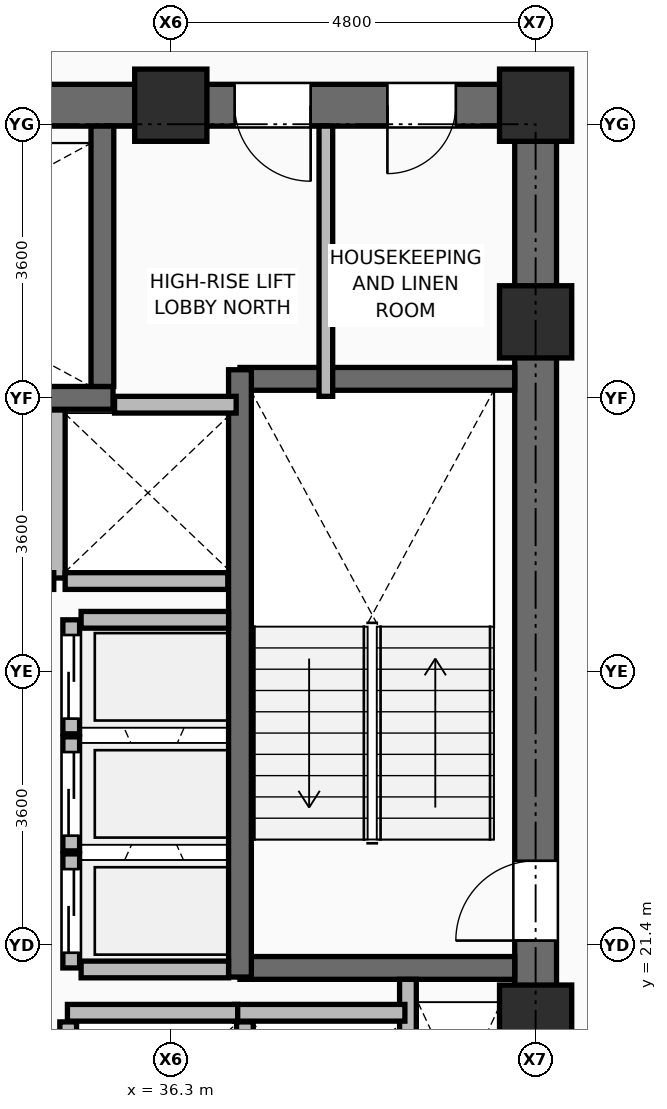
"""IFC4 building model, lengths in metres.
Left out: names, types, materials, properties, quantities, classifications, styles, units other than length and angle.
Written with IfcOpenShell. Run it as: python <this file> out.ifc"""

import sys

from ifc_helpers import new_model, si_unit, direction, frame, frame_2d, origin, origin_2d, place, context, subcontext, project, spatial, rectangle, extrude, element, fill, save


model = new_model("IFC4")
c1 = context("Model", 3, precision=1e-05, world=origin(), true_north=direction((0.0, 1.0)))
c2 = subcontext(c1, "Body", "Model", "MODEL_VIEW")
j1 = project(units=[si_unit("LENGTHUNIT", "METRE"), si_unit("PLANEANGLEUNIT", "RADIAN")], contexts=[c1])
p1 = place(None, origin())
s1 = spatial("IfcSite", under=j1, at=p1, CompositionType="ELEMENT")
p2 = place(p1, origin())
s2 = spatial("IfcBuilding", under=s1, at=p2, CompositionType="ELEMENT")
p3 = place(p2, frame((0.0, 0.0, 172.2)))
s3 = spatial("IfcBuildingStorey", under=s2, at=p3, CompositionType="ELEMENT", Elevation=172.2)
for number, where, z_axis, x_axis in (
    (1, (41.1, 20.4, 0.0), (0.0, 0.0, 1.0), (1.0, 0.0, 0.0)),
    (2, (41.1, 29.6, 0.0), (0.0, 0.0, 1.0), (1.0, 0.0, 0.0)),
    (3, (36.3, 32.45, 0.0), (0.0, 0.0, 1.0), (1.0, 0.0, 0.0)),
    (4, (41.1, 32.45, 0.0), (0.0, 0.0, 1.0), (1.0, 0.0, 0.0)),
):
    element("IfcColumn", number, at=place(p3, frame(where, z_axis=z_axis, x_axis=x_axis)), inside=s3, PredefinedType="COLUMN", context=c2, shape_type="SweptSolid", body=[
        extrude(rectangle(XDim=0.95, YDim=0.95, at=origin_2d()), origin(), (0.0, 0.0, 1.0), 3.75),
    ])
p4 = place(p3, frame((34.95, 17.92, 0.0), z_axis=(0.0, 0.0, 1.0), x_axis=(0.0, 1.0, 0.0)))
e5 = element("IfcWall", 5, at=p4, inside=s3, PredefinedType="PARTITIONING", context=c2, shape_type="SweptSolid", body=[
    extrude(rectangle(XDim=2.47, YDim=0.22, at=frame_2d((1.235, 0.0))), origin(), (0.0, 0.0, 1.0), 2.936),
])
p5 = place(p3, frame((37.275, 18.08, 0.0), z_axis=(0.0, 0.0, 1.0), x_axis=(0.0, 1.0, 0.0)))
e6 = element("IfcWall", 6, at=p5, inside=s3, PredefinedType="PARTITIONING", context=c2, shape_type="SweptSolid", body=[
    extrude(rectangle(XDim=2.31, YDim=0.22, at=frame_2d((1.155, 0.0))), origin(), (0.0, 0.0, 1.0), 3.475),
])
p6 = place(p3, frame((34.8, 26.23, 0.0), z_axis=(0.0, 0.0, 1.0), x_axis=(0.0, 1.0, 0.0)))
e7 = element("IfcWall", 7, at=p6, inside=s3, PredefinedType="PARTITIONING", context=c2, shape_type="SweptSolid", body=[
    extrude(rectangle(XDim=2.21, YDim=0.22, at=frame_2d((1.105, 0.0))), origin(), (0.0, 0.0, 1.0), 3.475),
])
p7 = place(p3, frame((34.91, 26.19, 0.0), z_axis=(0.0, 0.0, 1.0), x_axis=(1.0, 0.0, 0.0)))
e8 = element("IfcWall", 8, at=p7, inside=s3, PredefinedType="PARTITIONING", context=c2, shape_type="SweptSolid", body=[
    extrude(rectangle(XDim=2.14, YDim=0.22, at=frame_2d((1.07, 0.0))), origin(), (0.0, 0.0, 1.0), 3.475),
])
p8 = place(p3, frame((21.625, 32.45, 0.0), z_axis=(0.0, 0.0, 1.0), x_axis=(1.0, 0.0, 0.0)))
e9 = element("IfcWall", 9, at=p8, inside=s3, PredefinedType="SHEAR", context=c2, shape_type="SweptSolid", body=[
    extrude(rectangle(XDim=19.75, YDim=0.55, at=frame_2d((9.875, 0.0))), origin(), (0.0, 0.0, 1.0), 3.5),
])
p9 = place(p8, frame((2.125, 0.0, 0.0)))
e10 = element("IfcOpeningElement", 10, at=p9, cuts=e9, PredefinedType="OPENING", context=c2, shape_type="SweptSolid", body=[
    extrude(rectangle(XDim=1.1, YDim=2.1, at=frame_2d((0.55, 1.05))), frame((0.0, 0.285, 0.0), z_axis=(0.0, -1.0, 0.0), x_axis=(1.0, 0.0, 0.0)), (0.0, 0.0, 1.0), 0.57),
])
p10 = place(p8, frame((15.515, 0.0, 0.0)))
e11 = element("IfcOpeningElement", 11, at=p10, cuts=e9, PredefinedType="OPENING", context=c2, shape_type="SweptSolid", body=[
    extrude(rectangle(XDim=1.0, YDim=2.1, at=frame_2d((0.5, 1.05))), frame((0.0, 0.285, 0.0), z_axis=(0.0, -1.0, 0.0), x_axis=(1.0, 0.0, 0.0)), (0.0, 0.0, 1.0), 0.57),
])
p11 = place(p8, frame((17.525, 0.0, 0.0)))
e12 = element("IfcOpeningElement", 12, at=p11, cuts=e9, PredefinedType="OPENING", context=c2, shape_type="SweptSolid", body=[
    extrude(rectangle(XDim=0.9, YDim=2.1, at=frame_2d((0.45, 1.05))), frame((0.0, 0.285, 0.0), z_axis=(0.0, -1.0, 0.0), x_axis=(1.0, 0.0, 0.0)), (0.0, 0.0, 1.0), 0.57),
])
p12 = place(p3, frame((41.1, 18.075, 0.0), z_axis=(0.0, 0.0, 1.0), x_axis=(0.0, 1.0, 0.0)))
e13 = element("IfcWall", 13, at=p12, inside=s3, PredefinedType="SHEAR", context=c2, shape_type="SweptSolid", body=[
    extrude(rectangle(XDim=14.1, YDim=0.55, at=frame_2d((7.05, 0.0))), origin(), (0.0, 0.0, 1.0), 3.5),
])
p13 = place(p12, frame((3.385, 0.0, 0.0)))
e14 = element("IfcOpeningElement", 14, at=p13, cuts=e13, PredefinedType="OPENING", context=c2, shape_type="SweptSolid", body=[
    extrude(rectangle(XDim=1.05, YDim=2.1, at=frame_2d((0.525, 1.05))), frame((0.0, 0.285, 0.0), z_axis=(0.0, -1.0, 0.0), x_axis=(1.0, 0.0, 0.0)), (0.0, 0.0, 1.0), 0.57),
])
for number, where, z_axis, x_axis in (
    (15, (37.21, 21.1, 0.0), (0.0, 0.0, 1.0), (1.0, 0.0, 0.0)),
    (16, (37.21, 28.85, 0.0), (0.0, 0.0, 1.0), (1.0, 0.0, 0.0)),
):
    element("IfcWall", number, at=place(p3, frame(where, z_axis=z_axis, x_axis=x_axis)), inside=s3, PredefinedType="SHEAR", context=c2, shape_type="SweptSolid", body=[
        extrude(rectangle(XDim=3.615, YDim=0.3, at=frame_2d((1.808, 0.0))), origin(), (0.0, 0.0, 1.0), 3.5),
    ])
p14 = place(p3, frame((37.21, 20.98, 0.0), z_axis=(0.0, 0.0, 1.0), x_axis=(0.0, 1.0, 0.0)))
e17 = element("IfcWall", 17, at=p14, inside=s3, PredefinedType="SHEAR", context=c2, shape_type="SweptSolid", body=[
    extrude(rectangle(XDim=7.99, YDim=0.3, at=frame_2d((3.995, 0.0))), origin(), (0.0, 0.0, 1.0), 3.5),
])
p15 = place(p3, frame((27.51, 28.6, 0.0), z_axis=(0.0, 0.0, 1.0), x_axis=(1.0, 0.0, 0.0)))
e18 = element("IfcWall", 18, at=p15, inside=s3, PredefinedType="SHEAR", context=c2, shape_type="SweptSolid", body=[
    extrude(rectangle(XDim=8.03, YDim=0.3, at=frame_2d((4.015, 0.0))), origin(), (0.0, 0.0, 1.0), 3.5),
])
p16 = place(p3, frame((35.4, 28.75, 0.0), z_axis=(0.0, 0.0, 1.0), x_axis=(0.0, 1.0, 0.0)))
e19 = element("IfcWall", 19, at=p16, inside=s3, PredefinedType="SHEAR", context=c2, shape_type="SweptSolid", body=[
    extrude(rectangle(XDim=3.425, YDim=0.3, at=frame_2d((1.712, 0.0))), origin(), (0.0, 0.0, 1.0), 3.5),
])
p17 = place(p3, frame((39.42, 18.075, 0.0), z_axis=(0.0, 0.0, 1.0), x_axis=(0.0, 1.0, 0.0)))
e20 = element("IfcWall", 20, at=p17, inside=s3, PredefinedType="PARTITIONING", context=c2, shape_type="SweptSolid", body=[
    extrude(rectangle(XDim=2.875, YDim=0.22, at=frame_2d((1.438, 0.0))), origin(), (0.0, 0.0, 1.0), 3.48),
])
for number, where, z_axis, x_axis in (
    (21, (37.14, 20.51, 0.0), (0.0, 0.0, 1.0), (1.0, 0.0, 0.0)),
    (22, (34.94, 20.51, 0.0), (0.0, 0.0, 1.0), (1.0, 0.0, 0.0)),
):
    element("IfcWall", number, at=place(p3, frame(where, z_axis=z_axis, x_axis=x_axis)), inside=s3, PredefinedType="PARTITIONING", context=c2, shape_type="SweptSolid", body=[
        extrude(rectangle(XDim=2.24, YDim=0.22, at=frame_2d((1.12, 0.0))), origin(), (0.0, 0.0, 1.0), 3.48),
    ])
p18 = place(p3, frame((32.44, 26.19, 0.0), z_axis=(0.0, 0.0, 1.0), x_axis=(1.0, 0.0, 0.0)))
e23 = element("IfcWall", 23, at=p18, inside=s3, PredefinedType="PARTITIONING", context=c2, shape_type="SweptSolid", body=[
    extrude(rectangle(XDim=2.32, YDim=0.22, at=frame_2d((1.16, 0.0))), origin(), (0.0, 0.0, 1.0), 3.48),
])
p19 = place(p3, frame((35.56, 28.51, 0.0), z_axis=(0.0, 0.0, 1.0), x_axis=(1.0, 0.0, 0.0)))
e24 = element("IfcWall", 24, at=p19, inside=s3, PredefinedType="PARTITIONING", context=c2, shape_type="SweptSolid", body=[
    extrude(rectangle(XDim=1.6, YDim=0.22, at=frame_2d((0.8, 0.0))), origin(), (0.0, 0.0, 1.0), 3.48),
])
p20 = place(p3, frame((34.99, 21.1, 0.0), z_axis=(0.0, 0.0, 1.0), x_axis=(0.0, 1.0, 0.0)))
e25 = element("IfcWall", 25, at=p20, inside=s3, PredefinedType="PARTITIONING", context=c2, shape_type="SweptSolid", body=[
    extrude(rectangle(XDim=1.5, YDim=0.22, at=frame_2d((0.75, 0.0))), origin(), (0.0, 0.0, 1.0), 3.48),
])
p21 = place(p20, frame((0.2, 0.0, 0.0)))
e26 = element("IfcOpeningElement", 26, at=p21, cuts=e25, PredefinedType="OPENING", context=c2, shape_type="SweptSolid", body=[
    extrude(rectangle(XDim=1.1, YDim=2.2, at=frame_2d((0.55, 1.1))), frame((0.0, 0.12, 0.0), z_axis=(0.0, -1.0, 0.0), x_axis=(1.0, 0.0, 0.0)), (0.0, 0.0, 1.0), 0.24),
])
p22 = place(p3, frame((34.99, 22.64, 0.0), z_axis=(0.0, 0.0, 1.0), x_axis=(0.0, 1.0, 0.0)))
e27 = element("IfcWall", 27, at=p22, inside=s3, PredefinedType="PARTITIONING", context=c2, shape_type="SweptSolid", body=[
    extrude(rectangle(XDim=1.5, YDim=0.22, at=frame_2d((0.75, 0.0))), origin(), (0.0, 0.0, 1.0), 3.48),
])
p23 = place(p22, frame((0.2, 0.0, 0.0)))
e28 = element("IfcOpeningElement", 28, at=p23, cuts=e27, PredefinedType="OPENING", context=c2, shape_type="SweptSolid", body=[
    extrude(rectangle(XDim=1.1, YDim=2.2, at=frame_2d((0.55, 1.1))), frame((0.0, 0.12, 0.0), z_axis=(0.0, -1.0, 0.0), x_axis=(1.0, 0.0, 0.0)), (0.0, 0.0, 1.0), 0.24),
])
p24 = place(p3, frame((34.99, 24.18, 0.0), z_axis=(0.0, 0.0, 1.0), x_axis=(0.0, 1.0, 0.0)))
e29 = element("IfcWall", 29, at=p24, inside=s3, PredefinedType="PARTITIONING", context=c2, shape_type="SweptSolid", body=[
    extrude(rectangle(XDim=1.5, YDim=0.22, at=frame_2d((0.75, 0.0))), origin(), (0.0, 0.0, 1.0), 3.48),
])
p25 = place(p24, frame((0.2, 0.0, 0.0)))
e30 = element("IfcOpeningElement", 30, at=p25, cuts=e29, PredefinedType="OPENING", context=c2, shape_type="SweptSolid", body=[
    extrude(rectangle(XDim=1.1, YDim=2.2, at=frame_2d((0.55, 1.1))), frame((0.0, 0.12, 0.0), z_axis=(0.0, -1.0, 0.0), x_axis=(1.0, 0.0, 0.0)), (0.0, 0.0, 1.0), 0.24),
])
for number, where, z_axis, x_axis in (
    (31, (35.12, 21.08, 0.0), (0.0, 0.0, 1.0), (1.0, 0.0, 0.0)),
    (32, (35.12, 25.68, 0.0), (0.0, 0.0, 1.0), (1.0, 0.0, 0.0)),
):
    element("IfcWall", number, at=place(p3, frame(where, z_axis=z_axis, x_axis=x_axis)), inside=s3, PredefinedType="PARTITIONING", context=c2, shape_type="SweptSolid", body=[
        extrude(rectangle(XDim=1.94, YDim=0.22, at=frame_2d((0.97, 0.0))), origin(), (0.0, 0.0, 1.0), 3.48),
    ])
p26 = place(p3, frame((38.34, 28.62, 0.0), z_axis=(0.0, 0.0, 1.0), x_axis=(0.0, 1.0, 0.0)))
e33 = element("IfcWall", 33, at=p26, inside=s3, PredefinedType="PARTITIONING", context=c2, shape_type="SweptSolid", body=[
    extrude(rectangle(XDim=3.555, YDim=0.18, at=frame_2d((1.777, 0.0))), origin(), (0.0, 0.0, 1.0), 3.48),
])
p27 = place(p13, origin())
e34 = element("IfcDoor", 34, at=p27, inside=s3, OperationType="SINGLE_SWING_LEFT", PredefinedType="DOOR", context=c2, shape_type="SweptSolid", body=[
    extrude(rectangle(XDim=1.05, YDim=2.1, at=frame_2d((0.525, 1.05))), frame((0.0, 0.025, 0.0), z_axis=(0.0, -1.0, 0.0), x_axis=(1.0, 0.0, 0.0)), (0.0, 0.0, 1.0), 0.05),
])
fill(e14, e34)
p28 = place(p21, origin())
e35 = element("IfcDoor", 35, at=p28, inside=s3, OperationType="DOUBLE_DOOR_SLIDING", PredefinedType="DOOR", context=c2, shape_type="SweptSolid", body=[
    extrude(rectangle(XDim=1.1, YDim=2.2, at=frame_2d((0.55, 1.1))), frame((0.0, 0.025, 0.0), z_axis=(0.0, -1.0, 0.0), x_axis=(1.0, 0.0, 0.0)), (0.0, 0.0, 1.0), 0.05),
])
fill(e26, e35)
p29 = place(p23, origin())
e36 = element("IfcDoor", 36, at=p29, inside=s3, OperationType="DOUBLE_DOOR_SLIDING", PredefinedType="DOOR", context=c2, shape_type="SweptSolid", body=[
    extrude(rectangle(XDim=1.1, YDim=2.2, at=frame_2d((0.55, 1.1))), frame((0.0, 0.025, 0.0), z_axis=(0.0, -1.0, 0.0), x_axis=(1.0, 0.0, 0.0)), (0.0, 0.0, 1.0), 0.05),
])
fill(e28, e36)
p30 = place(p25, origin())
e37 = element("IfcDoor", 37, at=p30, inside=s3, OperationType="DOUBLE_DOOR_SLIDING", PredefinedType="DOOR", context=c2, shape_type="SweptSolid", body=[
    extrude(rectangle(XDim=1.1, YDim=2.2, at=frame_2d((0.55, 1.1))), frame((0.0, 0.025, 0.0), z_axis=(0.0, -1.0, 0.0), x_axis=(1.0, 0.0, 0.0)), (0.0, 0.0, 1.0), 0.05),
])
fill(e30, e37)
p31 = place(p10, frame((1.0, 0.0, 0.0), z_axis=(0.0, 0.0, 1.0), x_axis=(-1.0, 0.0, 0.0)))
e38 = element("IfcDoor", 38, at=p31, inside=s3, OperationType="SINGLE_SWING_LEFT", PredefinedType="DOOR", context=c2, shape_type="SweptSolid", body=[
    extrude(rectangle(XDim=1.0, YDim=2.1, at=frame_2d((0.5, 1.05))), frame((0.0, 0.025, 0.0), z_axis=(0.0, -1.0, 0.0), x_axis=(1.0, 0.0, 0.0)), (0.0, 0.0, 1.0), 0.05),
])
fill(e11, e38)
p32 = place(p11, frame((0.9, 0.0, 0.0), z_axis=(0.0, 0.0, 1.0), x_axis=(-1.0, 0.0, 0.0)))
e39 = element("IfcDoor", 39, at=p32, inside=s3, OperationType="SINGLE_SWING_RIGHT", PredefinedType="DOOR", context=c2, shape_type="SweptSolid", body=[
    extrude(rectangle(XDim=0.9, YDim=2.1, at=frame_2d((0.45, 1.05))), frame((0.0, 0.025, 0.0), z_axis=(0.0, -1.0, 0.0), x_axis=(1.0, 0.0, 0.0)), (0.0, 0.0, 1.0), 0.05),
])
fill(e12, e39)
save(model, sys.argv[1])
